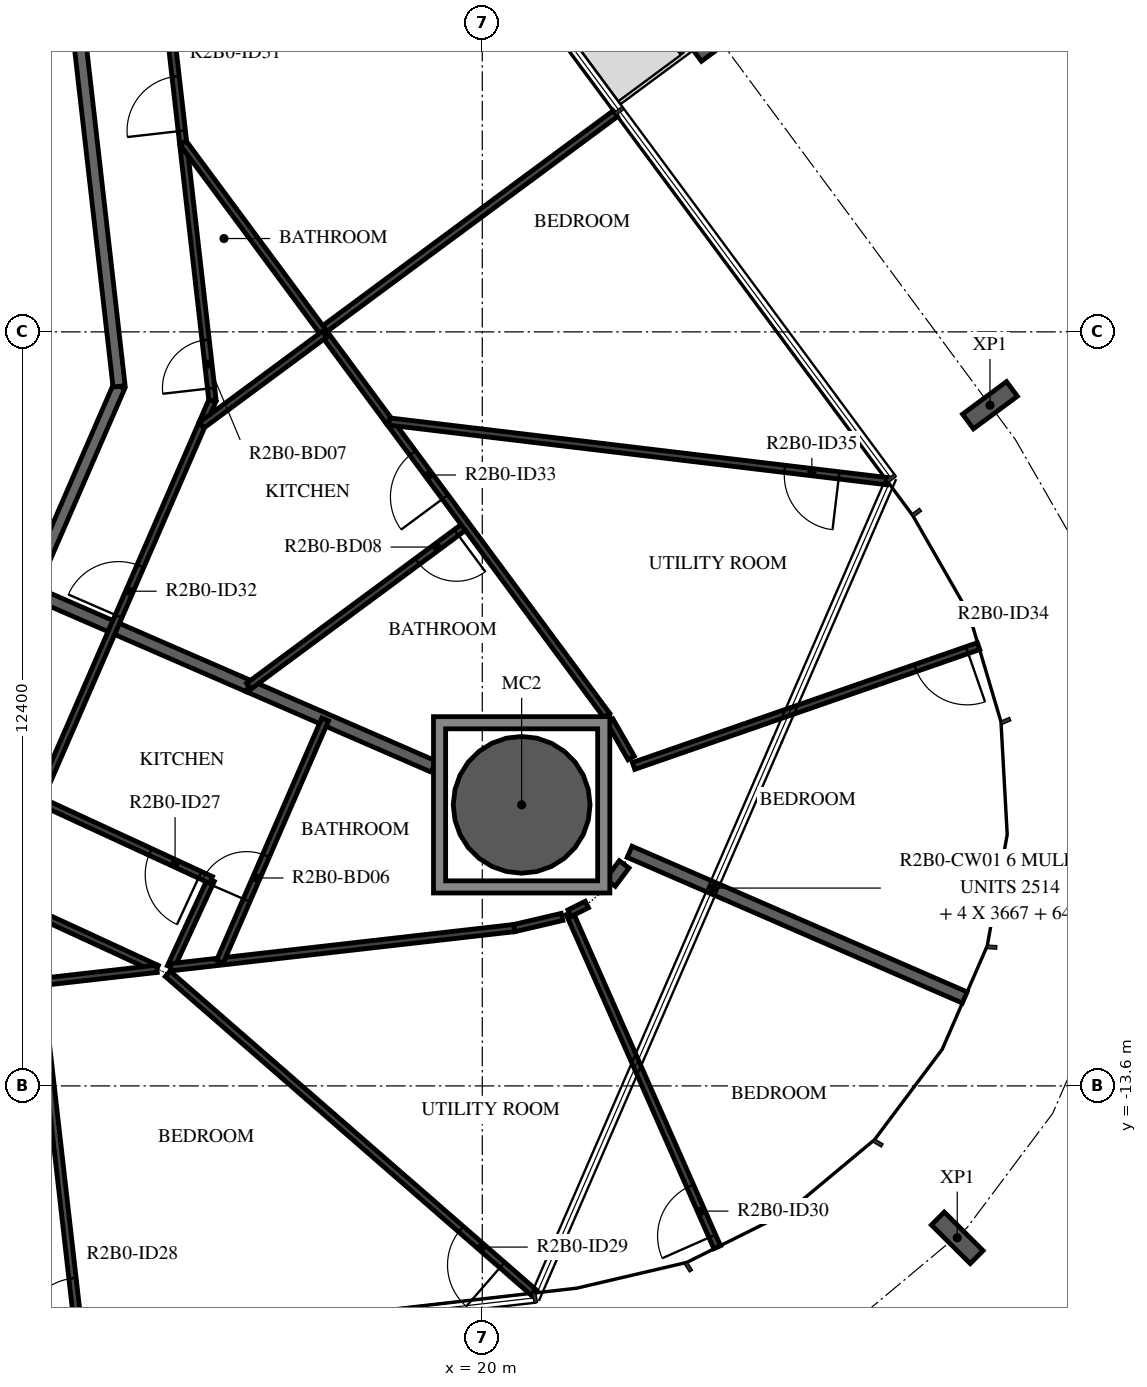
"""IFC4 building model, lengths in metres.
Left out: names, types, materials, properties, quantities, classifications, styles, units other than length and angle.
Written with IfcOpenShell. Run it as: python <this file> out.ifc"""

import sys

from ifc_helpers import new_model, si_unit, direction, frame, frame_2d, origin, origin_2d, place, context, subcontext, project, spatial, polyline, rectangle, hollow_circle, i_section, outline, extrude, element, fill, save


model = new_model("IFC4")
c1 = context("Model", 3, precision=1e-05, world=origin(), true_north=direction((0.0, 1.0)))
c2 = subcontext(c1, "Body", "Model", "MODEL_VIEW")
j1 = project(units=[si_unit("LENGTHUNIT", "METRE"), si_unit("PLANEANGLEUNIT", "RADIAN")], contexts=[c1])
p1 = place(None, origin())
s1 = spatial("IfcSite", under=j1, at=p1, CompositionType="ELEMENT")
p2 = place(p1, origin())
s2 = spatial("IfcBuilding", under=s1, at=p2, CompositionType="ELEMENT")
p3 = place(p2, frame((0.0, 0.0, 90.7)))
s3 = spatial("IfcBuildingStorey", under=s2, at=p3, CompositionType="ELEMENT", Elevation=90.7)
p4 = place(p3, frame((20.648, -8.978, -0.38), z_axis=(0.0, 0.0, 1.0), x_axis=(1.0, 0.0, 0.0)))
e1 = element("IfcColumn", 1, at=p4, inside=s3, PredefinedType="COLUMN", context=c2, shape_type="SweptSolid", body=[
    extrude(hollow_circle(Radius=1.125, WallThickness=0.055, at=origin_2d()), origin(), (0.0, 0.0, 1.0), 3.5),
])
for number, where, z_axis, x_axis in (
    (2, (27.811, -16.098, -0.38), (0.0, 0.0, 1.0), (-0.705, -0.709, 0.0)),
    (3, (28.349, -2.406, -0.38), (0.0, 0.0, 1.0), (0.595, -0.804, 0.0)),
    (4, (23.877, 3.638, -0.38), (0.0, 0.0, 1.0), (0.595, -0.804, 0.0)),
):
    element("IfcColumn", number, at=place(p3, frame(where, z_axis=z_axis, x_axis=x_axis)), inside=s3, PredefinedType="COLUMN", context=c2, shape_type="SweptSolid", body=[
        extrude(i_section(OverallWidth=0.3, OverallDepth=0.9, WebThickness=0.019, FlangeThickness=0.035, FilletRadius=0.03, at=origin_2d()), origin(), (0.0, 0.0, 1.0), 3.5),
    ])
p5 = place(p3, frame((11.1, -8.829, 0.0), z_axis=(0.0, 0.0, 1.0), x_axis=(0.398741918631, 0.917063183388, 0.0)))
e5 = element("IfcWall", 5, at=p5, inside=s3, PredefinedType="STANDARD", context=c2, shape_type="SweptSolid", body=[
    extrude(rectangle(XDim=7.342, YDim=0.2, at=frame_2d((3.671, 0.0))), origin(), (0.0, 0.0, 1.0), 3.12),
])
p6 = place(p3, frame((14.028, -2.096, 0.0), z_axis=(0.0, 0.0, 1.0), x_axis=(-0.113207047924, 0.993571418822, 0.0)))
e6 = element("IfcWall", 6, at=p6, inside=s3, PredefinedType="STANDARD", context=c2, shape_type="SweptSolid", body=[
    extrude(rectangle(XDim=7.24, YDim=0.2, at=frame_2d((3.62, 0.0))), origin(), (0.0, 0.0, 1.0), 3.12),
])
p7 = place(p6, frame((6.04, 0.0, 0.0)))
e7 = element("IfcOpeningElement", 7, at=p7, cuts=e6, PredefinedType="OPENING", context=c2, shape_type="SweptSolid", body=[
    extrude(rectangle(XDim=1.0, YDim=2.1, at=frame_2d((0.5, 1.05))), frame((0.0, 0.11, 0.0), z_axis=(0.0, -1.0, 0.0), x_axis=(1.0, 0.0, 0.0)), (0.0, 0.0, 1.0), 0.22),
])
p8 = place(p3, frame((16.16, -7.027, 0.0), z_axis=(0.0, 0.0, 1.0), x_axis=(-0.917065107526, 0.398737493293, 0.0)))
e8 = element("IfcWall", 8, at=p8, inside=s3, PredefinedType="STANDARD", context=c2, shape_type="SweptSolid", body=[
    extrude(rectangle(XDim=3.922, YDim=0.2, at=frame_2d((1.961, 0.0))), origin(), (0.0, 0.0, 1.0), 3.12),
])
p9 = place(p3, frame((19.198, -8.347, 0.0), z_axis=(0.0, 0.0, 1.0), x_axis=(-0.917046616943, 0.398780017495, 0.0)))
e9 = element("IfcWall", 9, at=p9, inside=s3, PredefinedType="STANDARD", context=c2, shape_type="SweptSolid", body=[
    extrude(rectangle(XDim=3.312, YDim=0.2, at=frame_2d((1.656, 0.0))), origin(), (0.0, 0.0, 1.0), 3.12),
])
p10 = place(p3, frame((27.935, -12.146, 0.0), z_axis=(0.0, 0.0, 1.0), x_axis=(-0.917058430913, 0.398752848631, 0.0)))
e10 = element("IfcWall", 10, at=p10, inside=s3, PredefinedType="STANDARD", context=c2, shape_type="SweptSolid", body=[
    extrude(rectangle(XDim=6.01, YDim=0.2, at=frame_2d((3.005, 0.0))), origin(), (0.0, 0.0, 1.0), 3.12),
])
p11 = place(p3, frame((22.333, -9.957, 0.0), z_axis=(0.0, 0.0, 1.0), x_axis=(-0.599479717237, -0.800389947851, 0.0)))
e11 = element("IfcWall", 11, at=p11, inside=s3, PredefinedType="STANDARD", context=c2, shape_type="SweptSolid", body=[
    extrude(rectangle(XDim=0.375, YDim=0.2, at=frame_2d((0.188, 0.0))), origin(), (0.0, 0.0, 1.0), 3.12),
])
p12 = place(p3, frame((11.649, -10.289, 0.0), z_axis=(0.0, 0.0, 1.0), x_axis=(0.9079269461, -0.419128453514, 0.0)))
e12 = element("IfcWall", 12, at=p12, inside=s3, PredefinedType="PARTITIONING", context=c2, shape_type="SweptSolid", body=[
    extrude(rectangle(XDim=3.304, YDim=0.12, at=frame_2d((1.652, 0.0))), origin(), (0.0, 0.0, 1.0), 3.12),
])
p13 = place(p3, frame((14.875, -11.648, 0.0), z_axis=(0.0, 0.0, 1.0), x_axis=(0.419087543301, 0.90794583046, 0.0)))
e13 = element("IfcWall", 13, at=p13, inside=s3, PredefinedType="PARTITIONING", context=c2, shape_type="SweptSolid", body=[
    extrude(rectangle(XDim=1.582, YDim=0.12, at=frame_2d((0.791, 0.0))), origin(), (0.0, 0.0, 1.0), 3.12),
])
p14 = place(p3, frame((15.538, -10.212, 0.0), z_axis=(0.0, 0.0, 1.0), x_axis=(-0.907941075756, 0.419097844131, 0.0)))
e14 = element("IfcWall", 14, at=p14, inside=s3, PredefinedType="PARTITIONING", context=c2, shape_type="SweptSolid", body=[
    extrude(rectangle(XDim=3.122, YDim=0.12, at=frame_2d((1.561, 0.0))), origin(), (0.0, 0.0, 1.0), 3.12),
])
p15 = place(p14, frame((0.2, 0.0, 0.0)))
e15 = element("IfcOpeningElement", 15, at=p15, cuts=e14, PredefinedType="OPENING", context=c2, shape_type="SweptSolid", body=[
    extrude(rectangle(XDim=0.9, YDim=2.1, at=frame_2d((0.45, 1.05))), frame((0.0, 0.07, 0.0), z_axis=(0.0, -1.0, 0.0), x_axis=(1.0, 0.0, 0.0)), (0.0, 0.0, 1.0), 0.14),
])
p16 = place(p3, frame((12.703, -8.904, 0.0), z_axis=(0.0, 0.0, 1.0), x_axis=(0.398716154453, 0.917074385303, 0.0)))
e16 = element("IfcWall", 16, at=p16, inside=s3, PredefinedType="PARTITIONING", context=c2, shape_type="SweptSolid", body=[
    extrude(rectangle(XDim=7.173, YDim=0.12, at=frame_2d((3.586, 0.0))), origin(), (0.0, 0.0, 1.0), 3.12),
])
p17 = place(p16, frame((3.3, 0.0, 0.0)))
e17 = element("IfcOpeningElement", 17, at=p17, cuts=e16, PredefinedType="OPENING", context=c2, shape_type="SweptSolid", body=[
    extrude(rectangle(XDim=0.9, YDim=2.1, at=frame_2d((0.45, 1.05))), frame((0.0, 0.07, 0.0), z_axis=(0.0, -1.0, 0.0), x_axis=(1.0, 0.0, 0.0)), (0.0, 0.0, 1.0), 0.14),
])
p18 = place(p3, frame((14.649, -11.674, 0.0), z_axis=(0.0, 0.0, 1.0), x_axis=(-0.993573746873, -0.113186613721, 0.0)))
e18 = element("IfcWall", 18, at=p18, inside=s3, PredefinedType="PARTITIONING", context=c2, shape_type="SweptSolid", body=[
    extrude(rectangle(XDim=5.796, YDim=0.12, at=frame_2d((2.898, 0.0))), origin(), (0.0, 0.0, 1.0), 3.12),
])
p19 = place(p3, frame((13.386, -17.857, 0.0), z_axis=(0.0, 0.0, 1.0), x_axis=(-0.113200012983, 0.993572220355, 0.0)))
e19 = element("IfcWall", 19, at=p19, inside=s3, PredefinedType="PARTITIONING", context=c2, shape_type="SweptSolid", body=[
    extrude(rectangle(XDim=6.0, YDim=0.12, at=frame_2d((3.0, 0.0))), origin(), (0.0, 0.0, 1.0), 2.73),
])
p20 = place(p19, frame((0.2, 0.0, 0.0)))
e20 = element("IfcOpeningElement", 20, at=p20, cuts=e19, PredefinedType="OPENING", context=c2, shape_type="SweptSolid", body=[
    extrude(rectangle(XDim=0.9, YDim=2.1, at=frame_2d((0.45, 1.05))), frame((0.0, 0.07, 0.0), z_axis=(0.0, -1.0, 0.0), x_axis=(1.0, 0.0, 0.0)), (0.0, 0.0, 1.0), 0.14),
])
p21 = place(p3, frame((20.856, -17.006, 0.0), z_axis=(0.0, 0.0, 1.0), x_axis=(-0.75423134567, 0.656608770281, 0.0)))
e21 = element("IfcWall", 21, at=p21, inside=s3, PredefinedType="PARTITIONING", context=c2, shape_type="SweptSolid", body=[
    extrude(rectangle(XDim=7.995, YDim=0.12, at=frame_2d((3.998, 0.0))), origin(), (0.0, 0.0, 1.0), 3.12),
])
p22 = place(p21, frame((0.7, 0.0, 0.0)))
e22 = element("IfcOpeningElement", 22, at=p22, cuts=e21, PredefinedType="OPENING", context=c2, shape_type="SweptSolid", body=[
    extrude(rectangle(XDim=0.9, YDim=2.1, at=frame_2d((0.45, 1.05))), frame((0.0, 0.07, 0.0), z_axis=(0.0, -1.0, 0.0), x_axis=(1.0, 0.0, 0.0)), (0.0, 0.0, 1.0), 0.14),
])
p23 = place(p3, frame((20.527, -11.004, 0.0), z_axis=(0.0, 0.0, 1.0), x_axis=(-0.993568869194, -0.113229422712, 0.0)))
e23 = element("IfcWall", 23, at=p23, inside=s3, PredefinedType="PARTITIONING", context=c2, shape_type="SweptSolid", body=[
    extrude(rectangle(XDim=5.688, YDim=0.12, at=frame_2d((2.844, 0.0))), origin(), (0.0, 0.0, 1.0), 3.12),
])
p24 = place(p3, frame((21.312, -10.821, 0.0), z_axis=(0.0, 0.0, 1.0), x_axis=(-0.973765266404, -0.227554841621, 0.0)))
e24 = element("IfcWall", 24, at=p24, inside=s3, PredefinedType="PARTITIONING", context=c2, shape_type="SweptSolid", body=[
    extrude(rectangle(XDim=0.807, YDim=0.12, at=frame_2d((0.403, 0.0))), origin(), (0.0, 0.0, 1.0), 3.12),
])
p25 = place(p3, frame((23.864, -16.253, 0.0), z_axis=(0.0, 0.0, 1.0), x_axis=(-0.404274566917, 0.914637673915, 0.0)))
e25 = element("IfcWall", 25, at=p25, inside=s3, PredefinedType="PARTITIONING", context=c2, shape_type="SweptSolid", body=[
    extrude(rectangle(XDim=6.006, YDim=0.12, at=frame_2d((3.003, 0.0))), origin(), (0.0, 0.0, 1.0), 3.12),
])
p26 = place(p25, frame((0.2, 0.0, 0.0)))
e26 = element("IfcOpeningElement", 26, at=p26, cuts=e25, PredefinedType="OPENING", context=c2, shape_type="SweptSolid", body=[
    extrude(rectangle(XDim=0.9, YDim=2.1, at=frame_2d((0.45, 1.05))), frame((0.0, 0.07, 0.0), z_axis=(0.0, -1.0, 0.0), x_axis=(1.0, 0.0, 0.0)), (0.0, 0.0, 1.0), 0.14),
])
p27 = place(p3, frame((15.686, -11.556, 0.0), z_axis=(0.0, 0.0, 1.0), x_axis=(0.398724055903, 0.917070949951, 0.0)))
e27 = element("IfcWall", 27, at=p27, inside=s3, PredefinedType="PARTITIONING", context=c2, shape_type="SweptSolid", body=[
    extrude(rectangle(XDim=4.343, YDim=0.12, at=frame_2d((2.171, 0.0))), origin(), (0.0, 0.0, 1.0), 3.12),
])
p28 = place(p27, frame((1.1, 0.0, 0.0)))
e28 = element("IfcOpeningElement", 28, at=p28, cuts=e27, PredefinedType="OPENING", context=c2, shape_type="SweptSolid", body=[
    extrude(rectangle(XDim=0.8, YDim=2.1, at=frame_2d((0.4, 1.05))), frame((0.0, 0.07, 0.0), z_axis=(0.0, -1.0, 0.0), x_axis=(1.0, 0.0, 0.0)), (0.0, 0.0, 1.0), 0.14),
])
p29 = place(p3, frame((21.435, -10.76, 0.0), z_axis=(0.0, 0.0, 1.0), x_axis=(0.895041493646, 0.445982874841, 0.0)))
e29 = element("IfcWall", 29, at=p29, inside=s3, PredefinedType="PARTITIONING", context=c2, shape_type="SweptSolid", body=[
    extrude(rectangle(XDim=0.317, YDim=0.12, at=frame_2d((0.159, 0.0))), origin(), (0.0, 0.0, 1.0), 3.12),
])
p30 = place(p3, frame((15.563, -2.326, 0.0), z_axis=(0.0, 0.0, 1.0), x_axis=(-0.113209750844, 0.993571110849, 0.0)))
e30 = element("IfcWall", 30, at=p30, inside=s3, PredefinedType="PARTITIONING", context=c2, shape_type="SweptSolid", body=[
    extrude(rectangle(XDim=6.828, YDim=0.12, at=frame_2d((3.414, 0.0))), origin(), (0.0, 0.0, 1.0), 3.12),
])
p31 = place(p30, frame((4.461, 0.0, 0.0)))
e31 = element("IfcOpeningElement", 31, at=p31, cuts=e30, PredefinedType="OPENING", context=c2, shape_type="SweptSolid", body=[
    extrude(rectangle(XDim=0.9, YDim=2.1, at=frame_2d((0.45, 1.05))), frame((0.0, 0.07, 0.0), z_axis=(0.0, -1.0, 0.0), x_axis=(1.0, 0.0, 0.0)), (0.0, 0.0, 1.0), 0.14),
])
p32 = place(p30, frame((0.2, 0.0, 0.0)))
e32 = element("IfcOpeningElement", 32, at=p32, cuts=e30, PredefinedType="OPENING", context=c2, shape_type="SweptSolid", body=[
    extrude(rectangle(XDim=0.8, YDim=2.1, at=frame_2d((0.4, 1.05))), frame((0.0, 0.07, 0.0), z_axis=(0.0, -1.0, 0.0), x_axis=(1.0, 0.0, 0.0)), (0.0, 0.0, 1.0), 0.14),
])
p33 = place(p3, frame((17.366, -1.18, 0.0), z_axis=(0.0, 0.0, 1.0), x_axis=(0.803855518832, 0.594824600065, 0.0)))
e33 = element("IfcWall", 33, at=p33, inside=s3, PredefinedType="PARTITIONING", context=c2, shape_type="SweptSolid", body=[
    extrude(rectangle(XDim=6.0, YDim=0.12, at=frame_2d((3.0, 0.0))), origin(), (0.0, 0.0, 1.0), 2.73),
])
p34 = place(p3, frame((15.081, 1.907, 0.0), z_axis=(0.0, 0.0, 1.0), x_axis=(0.594819754849, -0.803859104098, 0.0)))
e34 = element("IfcWall", 34, at=p34, inside=s3, PredefinedType="PARTITIONING", context=c2, shape_type="SweptSolid", body=[
    extrude(rectangle(XDim=5.699, YDim=0.12, at=frame_2d((2.85, 0.0))), origin(), (0.0, 0.0, 1.0), 3.12),
])
p35 = place(p3, frame((28.162, -6.368, 0.0), z_axis=(0.0, 0.0, 1.0), x_axis=(-0.944645847702, -0.328091789624, 0.0)))
e35 = element("IfcWall", 35, at=p35, inside=s3, PredefinedType="PARTITIONING", context=c2, shape_type="SweptSolid", body=[
    extrude(rectangle(XDim=6.007, YDim=0.12, at=frame_2d((3.003, 0.0))), origin(), (0.0, 0.0, 1.0), 3.12),
])
p36 = place(p35, frame((0.2, 0.0, 0.0)))
e36 = element("IfcOpeningElement", 36, at=p36, cuts=e35, PredefinedType="OPENING", context=c2, shape_type="SweptSolid", body=[
    extrude(rectangle(XDim=0.9, YDim=2.1, at=frame_2d((0.45, 1.05))), frame((0.0, 0.07, 0.0), z_axis=(0.0, -1.0, 0.0), x_axis=(1.0, 0.0, 0.0)), (0.0, 0.0, 1.0), 0.14),
])
p37 = place(p3, frame((22.449, -8.207, 0.0), z_axis=(0.0, 0.0, 1.0), x_axis=(-0.497404938529, 0.867518488061, 0.0)))
e37 = element("IfcWall", 37, at=p37, inside=s3, PredefinedType="PARTITIONING", context=c2, shape_type="SweptSolid", body=[
    extrude(rectangle(XDim=0.706, YDim=0.12, at=frame_2d((0.353, 0.0))), origin(), (0.0, 0.0, 1.0), 3.12),
])
p38 = place(p3, frame((19.735, -4.382, 0.0), z_axis=(0.0, 0.0, 1.0), x_axis=(-0.803850825108, -0.594830943188, 0.0)))
e38 = element("IfcWall", 38, at=p38, inside=s3, PredefinedType="PARTITIONING", context=c2, shape_type="SweptSolid", body=[
    extrude(rectangle(XDim=4.447, YDim=0.12, at=frame_2d((2.223, 0.0))), origin(), (0.0, 0.0, 1.0), 3.12),
])
p39 = place(p38, frame((0.2, 0.0, 0.0)))
e39 = element("IfcOpeningElement", 39, at=p39, cuts=e38, PredefinedType="OPENING", context=c2, shape_type="SweptSolid", body=[
    extrude(rectangle(XDim=0.8, YDim=2.1, at=frame_2d((0.4, 1.05))), frame((0.0, 0.07, 0.0), z_axis=(0.0, -1.0, 0.0), x_axis=(1.0, 0.0, 0.0)), (0.0, 0.0, 1.0), 0.14),
])
p40 = place(p3, frame((22.048, -7.507, 0.0), z_axis=(0.0, 0.0, 1.0), x_axis=(-0.59484195588, 0.803842675855, 0.0)))
e40 = element("IfcWall", 40, at=p40, inside=s3, PredefinedType="PARTITIONING", context=c2, shape_type="SweptSolid", body=[
    extrude(rectangle(XDim=6.012, YDim=0.12, at=frame_2d((3.006, 0.0))), origin(), (0.0, 0.0, 1.0), 3.12),
])
p41 = place(p40, frame((4.469, 0.0, 0.0)))
e41 = element("IfcOpeningElement", 41, at=p41, cuts=e40, PredefinedType="OPENING", context=c2, shape_type="SweptSolid", body=[
    extrude(rectangle(XDim=0.9, YDim=2.1, at=frame_2d((0.45, 1.05))), frame((0.0, 0.07, 0.0), z_axis=(0.0, -1.0, 0.0), x_axis=(1.0, 0.0, 0.0)), (0.0, 0.0, 1.0), 0.14),
])
p42 = place(p3, frame((17.408, -1.237, 0.0), z_axis=(0.0, 0.0, 1.0), x_axis=(-0.803863255433, -0.594814144556, 0.0)))
e42 = element("IfcWall", 42, at=p42, inside=s3, PredefinedType="PARTITIONING", context=c2, shape_type="SweptSolid", body=[
    extrude(rectangle(XDim=2.514, YDim=0.12, at=frame_2d((1.257, 0.0))), origin(), (0.0, 0.0, 1.0), 3.12),
])
p43 = place(p3, frame((26.661, -3.655, 0.0), z_axis=(0.0, 0.0, 1.0), x_axis=(-0.992903144553, 0.11892579845, 0.0)))
e43 = element("IfcWall", 43, at=p43, inside=s3, PredefinedType="PARTITIONING", context=c2, shape_type="SweptSolid", body=[
    extrude(rectangle(XDim=8.249, YDim=0.12, at=frame_2d((4.124, 0.0))), origin(), (0.0, 0.0, 1.0), 3.12),
])
p44 = place(p43, frame((0.8, 0.0, 0.0)))
e44 = element("IfcOpeningElement", 44, at=p44, cuts=e43, PredefinedType="OPENING", context=c2, shape_type="SweptSolid", body=[
    extrude(rectangle(XDim=0.9, YDim=2.1, at=frame_2d((0.45, 1.05))), frame((0.0, 0.07, 0.0), z_axis=(0.0, -1.0, 0.0), x_axis=(1.0, 0.0, 0.0)), (0.0, 0.0, 1.0), 0.14),
])
p45 = place(p3, origin())
e45 = element("IfcWall", 45, at=p45, inside=s3, PredefinedType="STANDARD", context=c2, shape_type="SweptSolid", body=[
    extrude(outline(polyline([(22.098, -7.528), (22.098, -10.428), (19.198, -10.428), (19.198, -7.528), (22.098, -7.528)]), holes=[polyline([(19.398, -10.228), (21.898, -10.228), (21.898, -7.728), (19.398, -7.728), (19.398, -10.228)])]), origin(), (0.0, 0.0, 1.0), 3.12),
])
p46 = place(p15, origin())
e46 = element("IfcDoor", 46, at=p46, inside=s3, OperationType="SINGLE_SWING_LEFT", PredefinedType="DOOR", context=c2, shape_type="SweptSolid", body=[
    extrude(rectangle(XDim=0.9, YDim=2.1, at=frame_2d((0.45, 1.05))), frame((0.0, 0.025, 0.0), z_axis=(0.0, -1.0, 0.0), x_axis=(1.0, 0.0, 0.0)), (0.0, 0.0, 1.0), 0.05),
])
fill(e15, e46)
p47 = place(p20, origin())
e47 = element("IfcDoor", 47, at=p47, inside=s3, OperationType="SINGLE_SWING_RIGHT", PredefinedType="DOOR", context=c2, shape_type="SweptSolid", body=[
    extrude(rectangle(XDim=0.9, YDim=2.1, at=frame_2d((0.45, 1.05))), frame((0.0, 0.025, 0.0), z_axis=(0.0, -1.0, 0.0), x_axis=(1.0, 0.0, 0.0)), (0.0, 0.0, 1.0), 0.05),
])
fill(e20, e47)
p48 = place(p28, origin())
e48 = element("IfcDoor", 48, at=p48, inside=s3, OperationType="SINGLE_SWING_RIGHT", PredefinedType="DOOR", context=c2, shape_type="SweptSolid", body=[
    extrude(rectangle(XDim=0.8, YDim=2.1, at=frame_2d((0.4, 1.05))), frame((0.0, 0.025, 0.0), z_axis=(0.0, -1.0, 0.0), x_axis=(1.0, 0.0, 0.0)), (0.0, 0.0, 1.0), 0.05),
])
fill(e28, e48)
p49 = place(p22, origin())
e49 = element("IfcDoor", 49, at=p49, inside=s3, OperationType="SINGLE_SWING_RIGHT", PredefinedType="DOOR", context=c2, shape_type="SweptSolid", body=[
    extrude(rectangle(XDim=0.9, YDim=2.1, at=frame_2d((0.45, 1.05))), frame((0.0, 0.025, 0.0), z_axis=(0.0, -1.0, 0.0), x_axis=(1.0, 0.0, 0.0)), (0.0, 0.0, 1.0), 0.05),
])
fill(e22, e49)
p50 = place(p26, origin())
e50 = element("IfcDoor", 50, at=p50, inside=s3, OperationType="SINGLE_SWING_RIGHT", PredefinedType="DOOR", context=c2, shape_type="SweptSolid", body=[
    extrude(rectangle(XDim=0.9, YDim=2.1, at=frame_2d((0.45, 1.05))), frame((0.0, 0.025, 0.0), z_axis=(0.0, -1.0, 0.0), x_axis=(1.0, 0.0, 0.0)), (0.0, 0.0, 1.0), 0.05),
])
fill(e26, e50)
p51 = place(p31, origin())
e51 = element("IfcDoor", 51, at=p51, inside=s3, OperationType="SINGLE_SWING_LEFT", PredefinedType="DOOR", context=c2, shape_type="SweptSolid", body=[
    extrude(rectangle(XDim=0.9, YDim=2.1, at=frame_2d((0.45, 1.05))), frame((0.0, 0.025, 0.0), z_axis=(0.0, -1.0, 0.0), x_axis=(1.0, 0.0, 0.0)), (0.0, 0.0, 1.0), 0.05),
])
fill(e31, e51)
p52 = place(p17, origin())
e52 = element("IfcDoor", 52, at=p52, inside=s3, OperationType="SINGLE_SWING_RIGHT", PredefinedType="DOOR", context=c2, shape_type="SweptSolid", body=[
    extrude(rectangle(XDim=0.9, YDim=2.1, at=frame_2d((0.45, 1.05))), frame((0.0, 0.025, 0.0), z_axis=(0.0, -1.0, 0.0), x_axis=(1.0, 0.0, 0.0)), (0.0, 0.0, 1.0), 0.05),
])
fill(e17, e52)
p53 = place(p32, origin())
e53 = element("IfcDoor", 53, at=p53, inside=s3, OperationType="SINGLE_SWING_LEFT", PredefinedType="DOOR", context=c2, shape_type="SweptSolid", body=[
    extrude(rectangle(XDim=0.8, YDim=2.1, at=frame_2d((0.4, 1.05))), frame((0.0, 0.025, 0.0), z_axis=(0.0, -1.0, 0.0), x_axis=(1.0, 0.0, 0.0)), (0.0, 0.0, 1.0), 0.05),
])
fill(e32, e53)
p54 = place(p39, origin())
e54 = element("IfcDoor", 54, at=p54, inside=s3, OperationType="SINGLE_SWING_LEFT", PredefinedType="DOOR", context=c2, shape_type="SweptSolid", body=[
    extrude(rectangle(XDim=0.8, YDim=2.1, at=frame_2d((0.4, 1.05))), frame((0.0, 0.025, 0.0), z_axis=(0.0, -1.0, 0.0), x_axis=(1.0, 0.0, 0.0)), (0.0, 0.0, 1.0), 0.05),
])
fill(e39, e54)
p55 = place(p41, origin())
e55 = element("IfcDoor", 55, at=p55, inside=s3, OperationType="SINGLE_SWING_LEFT", PredefinedType="DOOR", context=c2, shape_type="SweptSolid", body=[
    extrude(rectangle(XDim=0.9, YDim=2.1, at=frame_2d((0.45, 1.05))), frame((0.0, 0.025, 0.0), z_axis=(0.0, -1.0, 0.0), x_axis=(1.0, 0.0, 0.0)), (0.0, 0.0, 1.0), 0.05),
])
fill(e41, e55)
p56 = place(p36, origin())
e56 = element("IfcDoor", 56, at=p56, inside=s3, OperationType="SINGLE_SWING_LEFT", PredefinedType="DOOR", context=c2, shape_type="SweptSolid", body=[
    extrude(rectangle(XDim=0.9, YDim=2.1, at=frame_2d((0.45, 1.05))), frame((0.0, 0.025, 0.0), z_axis=(0.0, -1.0, 0.0), x_axis=(1.0, 0.0, 0.0)), (0.0, 0.0, 1.0), 0.05),
])
fill(e36, e56)
p57 = place(p44, origin())
e57 = element("IfcDoor", 57, at=p57, inside=s3, OperationType="SINGLE_SWING_RIGHT", PredefinedType="DOOR", context=c2, shape_type="SweptSolid", body=[
    extrude(rectangle(XDim=0.9, YDim=2.1, at=frame_2d((0.45, 1.05))), frame((0.0, 0.025, 0.0), z_axis=(0.0, -1.0, 0.0), x_axis=(1.0, 0.0, 0.0)), (0.0, 0.0, 1.0), 0.05),
])
fill(e44, e57)
save(model, sys.argv[1])
